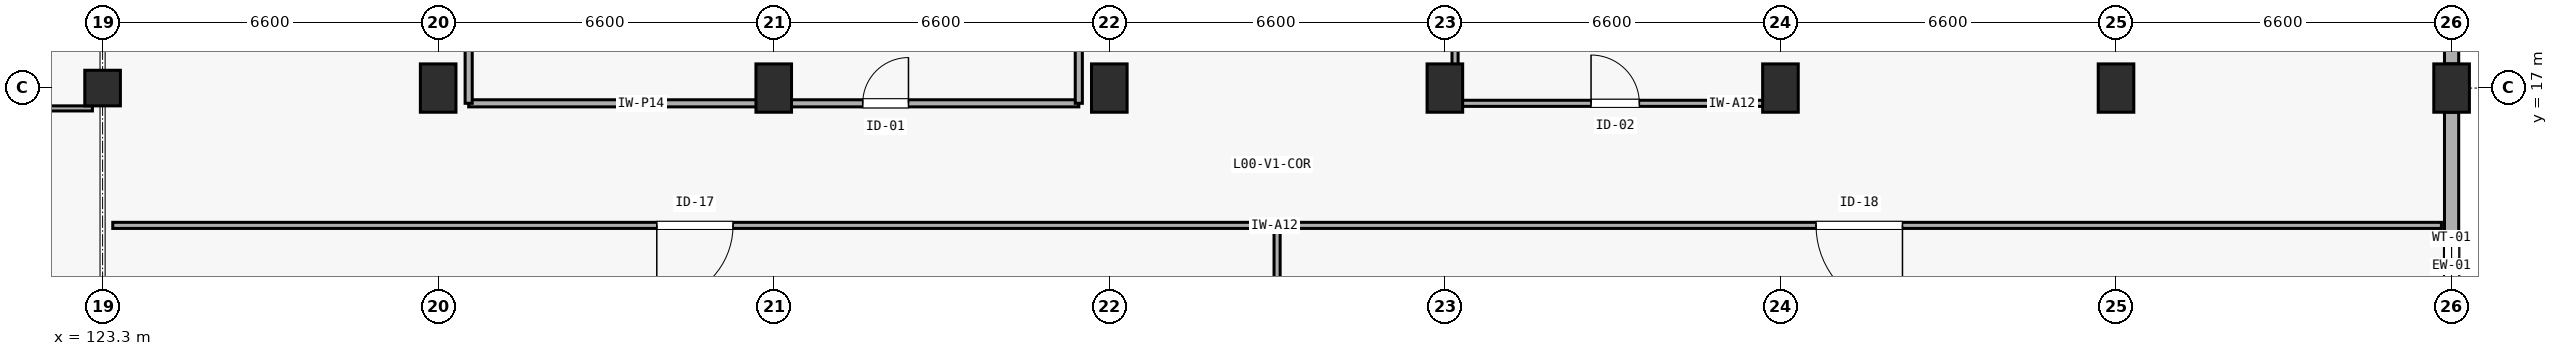
"""IFC4 building model, lengths in metres.
Left out: names, types, materials, properties, quantities, classifications, styles, units other than length and angle.
Written with IfcOpenShell. Run it as: python <this file> out.ifc"""

import sys

from ifc_helpers import new_model, si_unit, direction, frame, frame_2d, origin, origin_2d, place, context, subcontext, project, spatial, rectangle, extrude, element, fill, save


model = new_model("IFC4")
c1 = context("Model", 3, precision=1e-05, world=origin(), true_north=direction((0.0, 1.0)))
c2 = subcontext(c1, "Body", "Model", "MODEL_VIEW")
j1 = project(units=[si_unit("LENGTHUNIT", "METRE"), si_unit("PLANEANGLEUNIT", "RADIAN")], contexts=[c1])
p1 = place(None, origin())
s1 = spatial("IfcSite", under=j1, at=p1, CompositionType="ELEMENT")
p2 = place(p1, origin())
s2 = spatial("IfcBuilding", under=s1, at=p2, CompositionType="ELEMENT")
p3 = place(p2, origin())
s3 = spatial("IfcBuildingStorey", under=s2, at=p3, CompositionType="ELEMENT", Elevation=0.0)
p4 = place(p3, frame((123.3, 17.0, 0.0), z_axis=(0.0, 0.0, 1.0), x_axis=(1.0, 0.0, 0.0)))
e1 = element("IfcColumn", 1, at=p4, inside=s3, PredefinedType="COLUMN", context=c2, shape_type="SweptSolid", body=[
    extrude(rectangle(XDim=0.7, YDim=0.7, at=origin_2d()), origin(), (0.0, 0.0, 1.0), 4.2),
])
for number, where, z_axis, x_axis in (
    (2, (129.9, 17.0, 0.0), (0.0, 0.0, 1.0), (1.0, 0.0, 0.0)),
    (3, (136.5, 17.0, 0.0), (0.0, 0.0, 1.0), (1.0, 0.0, 0.0)),
    (4, (143.1, 17.0, 0.0), (0.0, 0.0, 1.0), (1.0, 0.0, 0.0)),
    (5, (149.7, 17.0, 0.0), (0.0, 0.0, 1.0), (1.0, 0.0, 0.0)),
    (6, (156.3, 17.0, 0.0), (0.0, 0.0, 1.0), (1.0, 0.0, 0.0)),
    (7, (162.9, 17.0, 0.0), (0.0, 0.0, 1.0), (1.0, 0.0, 0.0)),
    (8, (169.5, 17.0, 0.0), (0.0, 0.0, 1.0), (1.0, 0.0, 0.0)),
):
    element("IfcColumn", number, at=place(p3, frame(where, z_axis=z_axis, x_axis=x_axis)), inside=s3, PredefinedType="COLUMN", context=c2, shape_type="SweptSolid", body=[
        extrude(rectangle(XDim=0.7, YDim=0.95, at=origin_2d()), origin(), (0.0, 0.0, 1.0), 4.2),
    ])
p5 = place(p3, frame((169.5, 10.475, 0.0), z_axis=(0.0, 0.0, 1.0), x_axis=(0.0, 1.0, 0.0)))
e9 = element("IfcWall", 9, at=p5, inside=s3, PredefinedType="SOLIDWALL", context=c2, shape_type="SweptSolid", body=[
    extrude(rectangle(XDim=6.05, YDim=0.28, at=frame_2d((3.025, 0.0))), origin(), (0.0, 0.0, 1.0), 3.565),
])
p6 = place(p5, frame((2.425, 0.0, 0.85)))
e10 = element("IfcOpeningElement", 10, at=p6, cuts=e9, PredefinedType="OPENING", context=c2, shape_type="SweptSolid", body=[
    extrude(rectangle(XDim=1.2, YDim=1.35, at=frame_2d((0.6, 0.675))), frame((0.0, 0.15, 0.0), z_axis=(0.0, -1.0, 0.0), x_axis=(1.0, 0.0, 0.0)), (0.0, 0.0, 1.0), 0.3),
])
p7 = place(p3, frame((169.5, 17.475, 0.0), z_axis=(0.0, 0.0, 1.0), x_axis=(0.0, 1.0, 0.0)))
e11 = element("IfcWall", 11, at=p7, inside=s3, PredefinedType="SOLIDWALL", context=c2, shape_type="SweptSolid", body=[
    extrude(rectangle(XDim=6.05, YDim=0.28, at=frame_2d((3.025, 0.0))), origin(), (0.0, 0.0, 1.0), 3.565),
])
p8 = place(p7, frame((1.725, 0.0, 0.0)))
e12 = element("IfcOpeningElement", 12, at=p8, cuts=e11, PredefinedType="OPENING", context=c2, shape_type="SweptSolid", body=[
    extrude(rectangle(XDim=2.6, YDim=2.35, at=frame_2d((1.3, 1.175))), frame((0.0, 0.15, 0.0), z_axis=(0.0, -1.0, 0.0), x_axis=(1.0, 0.0, 0.0)), (0.0, 0.0, 1.0), 0.3),
])
p9 = place(p3, frame((123.5, 14.3, 0.0), z_axis=(0.0, 0.0, 1.0), x_axis=(1.0, 0.0, 0.0)))
e13 = element("IfcWall", 13, at=p9, inside=s3, PredefinedType="PARTITIONING", context=c2, shape_type="SweptSolid", body=[
    extrude(rectangle(XDim=22.9, YDim=0.12, at=frame_2d((11.45, 0.0))), origin(), (0.0, 0.0, 1.0), 3.9),
])
p10 = place(p9, frame((10.7, 0.0, 0.0)))
e14 = element("IfcOpeningElement", 14, at=p10, cuts=e13, PredefinedType="OPENING", context=c2, shape_type="SweptSolid", body=[
    extrude(rectangle(XDim=1.5, YDim=2.15, at=frame_2d((0.75, 1.075))), frame((0.0, 0.07, 0.0), z_axis=(0.0, -1.0, 0.0), x_axis=(1.0, 0.0, 0.0)), (0.0, 0.0, 1.0), 0.14),
])
p11 = place(p3, frame((146.4, 3.2, 0.0), z_axis=(0.0, 0.0, 1.0), x_axis=(0.0, 1.0, 0.0)))
e15 = element("IfcWall", 15, at=p11, inside=s3, PredefinedType="PARTITIONING", context=c2, shape_type="SweptSolid", body=[
    extrude(rectangle(XDim=11.1, YDim=0.12, at=frame_2d((5.55, 0.0))), origin(), (0.0, 0.0, 1.0), 3.9),
])
p12 = place(p3, frame((146.4, 14.3, 0.0), z_axis=(0.0, 0.0, 1.0), x_axis=(1.0, 0.0, 0.0)))
e16 = element("IfcWall", 16, at=p12, inside=s3, PredefinedType="PARTITIONING", context=c2, shape_type="SweptSolid", body=[
    extrude(rectangle(XDim=22.9, YDim=0.12, at=frame_2d((11.45, 0.0))), origin(), (0.0, 0.0, 1.0), 3.9),
])
p13 = place(p12, frame((10.6, 0.0, 0.0)))
e17 = element("IfcOpeningElement", 17, at=p13, cuts=e16, PredefinedType="OPENING", context=c2, shape_type="SweptSolid", body=[
    extrude(rectangle(XDim=1.7, YDim=2.2, at=frame_2d((0.85, 1.1))), frame((0.0, 0.07, 0.0), z_axis=(0.0, -1.0, 0.0), x_axis=(1.0, 0.0, 0.0)), (0.0, 0.0, 1.0), 0.14),
])
p14 = place(p3, frame((130.5, 16.7, 0.0), z_axis=(0.0, 0.0, 1.0), x_axis=(1.0, 0.0, 0.0)))
e18 = element("IfcWall", 18, at=p14, inside=s3, PredefinedType="PLUMBINGWALL", context=c2, shape_type="SweptSolid", body=[
    extrude(rectangle(XDim=12.0, YDim=0.14, at=frame_2d((6.0, 0.0))), origin(), (0.0, 0.0, 1.0), 3.345),
])
p15 = place(p14, frame((7.75, 0.0, 0.0)))
e19 = element("IfcOpeningElement", 19, at=p15, cuts=e18, PredefinedType="OPENING", context=c2, shape_type="SweptSolid", body=[
    extrude(rectangle(XDim=0.9, YDim=2.1, at=frame_2d((0.45, 1.05))), frame((0.0, 0.08, 0.0), z_axis=(0.0, -1.0, 0.0), x_axis=(1.0, 0.0, 0.0)), (0.0, 0.0, 1.0), 0.16),
])
for number, where, z_axis, x_axis in (
    (20, (130.5, 16.7, 0.0), (0.0, 0.0, 1.0), (0.0, 1.0, 0.0)),
    (21, (142.5, 16.7, 0.0), (0.0, 0.0, 1.0), (0.0, 1.0, 0.0)),
):
    element("IfcWall", number, at=place(p3, frame(where, z_axis=z_axis, x_axis=x_axis)), inside=s3, PredefinedType="PLUMBINGWALL", context=c2, shape_type="SweptSolid", body=[
        extrude(rectangle(XDim=7.1, YDim=0.14, at=frame_2d((3.55, 0.0))), origin(), (0.0, 0.0, 1.0), 3.9),
    ])
p16 = place(p3, frame((149.9, 16.7, 0.0), z_axis=(0.0, 0.0, 1.0), x_axis=(1.0, 0.0, 0.0)))
e22 = element("IfcWall", 22, at=p16, inside=s3, PredefinedType="PARTITIONING", context=c2, shape_type="SweptSolid", body=[
    extrude(rectangle(XDim=6.3, YDim=0.12, at=frame_2d((3.15, 0.0))), origin(), (0.0, 0.0, 1.0), 3.235),
])
p17 = place(p16, frame((2.675, 0.0, 0.0)))
e23 = element("IfcOpeningElement", 23, at=p17, cuts=e22, PredefinedType="OPENING", context=c2, shape_type="SweptSolid", body=[
    extrude(rectangle(XDim=0.95, YDim=2.1, at=frame_2d((0.475, 1.05))), frame((0.0, 0.07, 0.0), z_axis=(0.0, -1.0, 0.0), x_axis=(1.0, 0.0, 0.0)), (0.0, 0.0, 1.0), 0.14),
])
p18 = place(p3, frame((149.9, 16.7, 0.0), z_axis=(0.0, 0.0, 1.0), x_axis=(0.0, 1.0, 0.0)))
e24 = element("IfcWall", 24, at=p18, inside=s3, PredefinedType="PARTITIONING", context=c2, shape_type="SweptSolid", body=[
    extrude(rectangle(XDim=7.1, YDim=0.12, at=frame_2d((3.55, 0.0))), origin(), (0.0, 0.0, 1.0), 3.405),
])
p19 = place(p3, frame((106.5, 16.6, 0.0), z_axis=(0.0, 0.0, 1.0), x_axis=(1.0, 0.0, 0.0)))
e25 = element("IfcWall", 25, at=p19, inside=s3, PredefinedType="PARTITIONING", context=c2, shape_type="SweptSolid", body=[
    extrude(rectangle(XDim=16.6, YDim=0.1, at=frame_2d((8.3, 0.0))), origin(), (0.0, 0.0, 1.0), 3.9),
])
p20 = place(p6, origin())
e26 = element("IfcWindow", 26, at=p20, inside=s3, PartitioningType="SINGLE_PANEL", PredefinedType="WINDOW", context=c2, shape_type="SweptSolid", body=[
    extrude(rectangle(XDim=1.2, YDim=1.35, at=frame_2d((0.6, 0.675))), frame((0.0, 0.03, 0.0), z_axis=(0.0, -1.0, 0.0), x_axis=(1.0, 0.0, 0.0)), (0.0, 0.0, 1.0), 0.06),
])
fill(e10, e26)
p21 = place(p10, frame((1.5, 0.0, 0.0), z_axis=(0.0, 0.0, 1.0), x_axis=(-1.0, 0.0, 0.0)))
e27 = element("IfcDoor", 27, at=p21, inside=s3, OperationType="SINGLE_SWING_RIGHT", PredefinedType="DOOR", context=c2, shape_type="SweptSolid", body=[
    extrude(rectangle(XDim=1.5, YDim=2.15, at=frame_2d((0.75, 1.075))), frame((0.0, 0.025, 0.0), z_axis=(0.0, -1.0, 0.0), x_axis=(1.0, 0.0, 0.0)), (0.0, 0.0, 1.0), 0.05),
])
fill(e14, e27)
p22 = place(p13, frame((1.7, 0.0, 0.0), z_axis=(0.0, 0.0, 1.0), x_axis=(-1.0, 0.0, 0.0)))
e28 = element("IfcDoor", 28, at=p22, inside=s3, OperationType="SINGLE_SWING_LEFT", PredefinedType="DOOR", context=c2, shape_type="SweptSolid", body=[
    extrude(rectangle(XDim=1.7, YDim=2.2, at=frame_2d((0.85, 1.1))), frame((0.0, 0.025, 0.0), z_axis=(0.0, -1.0, 0.0), x_axis=(1.0, 0.0, 0.0)), (0.0, 0.0, 1.0), 0.05),
])
fill(e17, e28)
p23 = place(p15, origin())
e29 = element("IfcDoor", 29, at=p23, inside=s3, OperationType="SINGLE_SWING_RIGHT", PredefinedType="DOOR", context=c2, shape_type="SweptSolid", body=[
    extrude(rectangle(XDim=0.9, YDim=2.1, at=frame_2d((0.45, 1.05))), frame((0.0, 0.025, 0.0), z_axis=(0.0, -1.0, 0.0), x_axis=(1.0, 0.0, 0.0)), (0.0, 0.0, 1.0), 0.05),
])
fill(e19, e29)
p24 = place(p17, origin())
e30 = element("IfcDoor", 30, at=p24, inside=s3, OperationType="SINGLE_SWING_LEFT", PredefinedType="DOOR", context=c2, shape_type="SweptSolid", body=[
    extrude(rectangle(XDim=0.95, YDim=2.1, at=frame_2d((0.475, 1.05))), frame((0.0, 0.025, 0.0), z_axis=(0.0, -1.0, 0.0), x_axis=(1.0, 0.0, 0.0)), (0.0, 0.0, 1.0), 0.05),
])
fill(e23, e30)
save(model, sys.argv[1])
